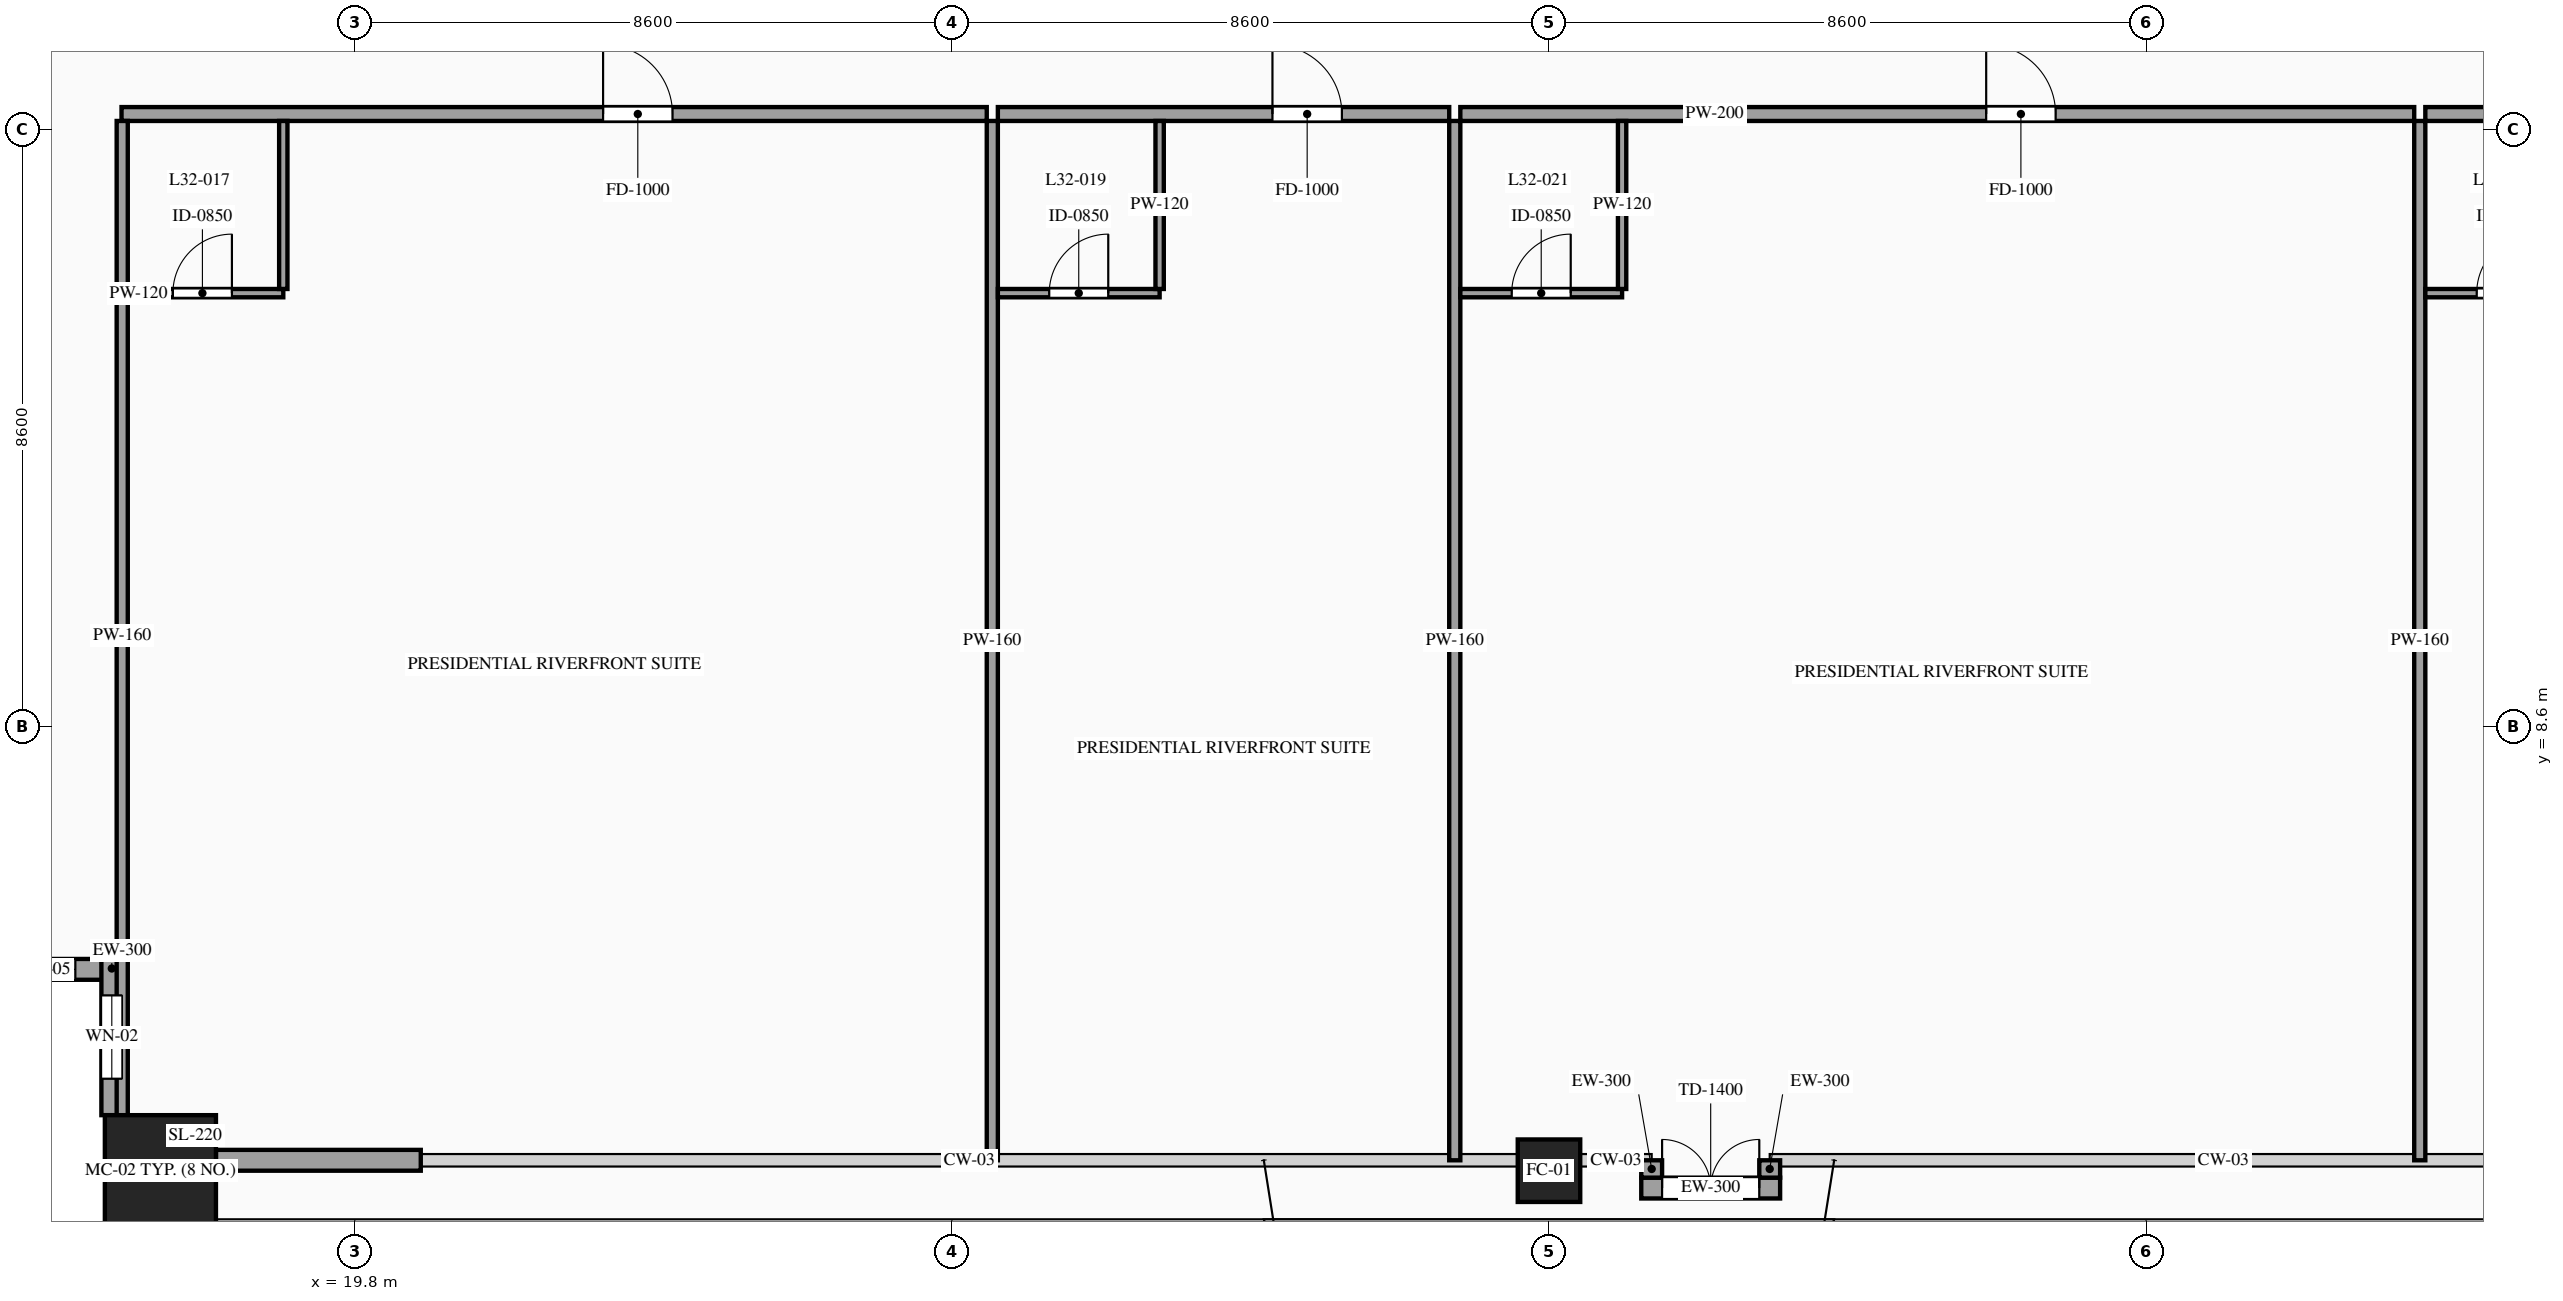
"""IFC4 building model, lengths in metres.
Left out: names, types, materials, properties, quantities, classifications, styles, units other than length and angle.
Written with IfcOpenShell. Run it as: python <this file> out.ifc"""

import sys

from ifc_helpers import new_model, si_unit, direction, frame, frame_2d, origin, origin_2d, place, context, subcontext, project, spatial, rectangle, hollow_rectangle, extrude, source, transform, mapped, element, fill, save


model = new_model("IFC4")
c1 = context("Model", 3, precision=1e-05, world=origin(), true_north=direction((0.0, 1.0)))
c2 = subcontext(c1, "Body", "Model", "MODEL_VIEW")
j1 = project(units=[si_unit("LENGTHUNIT", "METRE"), si_unit("PLANEANGLEUNIT", "RADIAN")], contexts=[c1])
p1 = place(None, origin())
s1 = spatial("IfcSite", under=j1, at=p1, CompositionType="ELEMENT")
p2 = place(p1, origin())
s2 = spatial("IfcBuilding", under=s1, at=p2, CompositionType="ELEMENT")
p3 = place(p2, frame((0.0, 0.0, 122.6)))
s3 = spatial("IfcBuildingStorey", under=s2, at=p3, CompositionType="ELEMENT", Elevation=122.6)
m1 = source(origin(), c2, "Body", "SweptSolid", [
    extrude(hollow_rectangle(XDim=1.6, YDim=1.6, WallThickness=0.07, at=origin_2d()), origin(), (0.0, 0.0, 1.0), 3.6),
])
p4 = place(p3, frame((17.0, 2.2, 0.0), z_axis=(0.0, 0.0, 1.0), x_axis=(1.0, 0.0, 0.0)))
e1 = element("IfcColumn", 1, at=p4, inside=s3, PredefinedType="COLUMN", context=c2, shape_type="MappedRepresentation", body=[
    mapped(m1, transform((0.0, 0.0, 0.0), scale=1.0)),
])
m2 = source(origin(), c2, "Body", "SweptSolid", [
    extrude(hollow_rectangle(XDim=0.9, YDim=0.9, WallThickness=0.042, at=origin_2d()), origin(), (0.0, 0.0, 1.0), 3.6),
])
p5 = place(p3, frame((37.0, 2.2, 0.0), z_axis=(0.0, 0.0, 1.0), x_axis=(1.0, 0.0, 0.0)))
e2 = element("IfcColumn", 2, at=p5, inside=s3, PredefinedType="COLUMN", context=c2, shape_type="MappedRepresentation", body=[
    mapped(m2, transform((0.0, 0.0, 0.0), scale=1.0)),
])
p6 = place(p3, frame((14.2, 5.1, 0.0), z_axis=(0.0, 0.0, 1.0), x_axis=(1.0, 0.0, 0.0)))
e3 = element("IfcWall", 3, at=p6, inside=s3, PredefinedType="SOLIDWALL", context=c2, shape_type="SweptSolid", body=[
    extrude(rectangle(XDim=2.25, YDim=0.3, at=frame_2d((1.125, 0.0))), origin(), (0.0, 0.0, 1.0), 3.38),
])
p7 = place(p6, frame((0.675, 0.0, 0.85)))
e4 = element("IfcOpeningElement", 4, at=p7, cuts=e3, PredefinedType="OPENING", context=c2, shape_type="SweptSolid", body=[
    extrude(rectangle(XDim=0.9, YDim=1.5, at=frame_2d((0.45, 0.75))), frame((0.0, 0.165, 0.0), z_axis=(0.0, -1.0, 0.0), x_axis=(1.0, 0.0, 0.0)), (0.0, 0.0, 1.0), 0.33),
])
p8 = place(p3, frame((16.3, 5.25, 0.0), z_axis=(0.0, 0.0, 1.0), x_axis=(0.0, -1.0, 0.0)))
e5 = element("IfcWall", 5, at=p8, inside=s3, PredefinedType="SOLIDWALL", context=c2, shape_type="SweptSolid", body=[
    extrude(rectangle(XDim=2.25, YDim=0.3, at=frame_2d((1.125, 0.0))), origin(), (0.0, 0.0, 1.0), 3.38),
])
p9 = place(p8, frame((0.525, 0.0, 0.85)))
e6 = element("IfcOpeningElement", 6, at=p9, cuts=e5, PredefinedType="OPENING", context=c2, shape_type="SweptSolid", body=[
    extrude(rectangle(XDim=1.2, YDim=2.1, at=frame_2d((0.6, 1.05))), frame((0.0, 0.165, 0.0), z_axis=(0.0, -1.0, 0.0), x_axis=(1.0, 0.0, 0.0)), (0.0, 0.0, 1.0), 0.33),
])
m3 = source(origin(), c2, "Body", "SweptSolid", [
    extrude(rectangle(XDim=2.95, YDim=0.3, at=frame_2d((1.475, 0.0))), origin(), (0.0, 0.0, 1.0), 2.775),
])
p10 = place(p3, frame((17.8, 2.35, 0.0), z_axis=(0.0, 0.0, 1.0), x_axis=(1.0, 0.0, 0.0)))
e7 = element("IfcWall", 7, at=p10, inside=s3, PredefinedType="SOLIDWALL", context=c2, shape_type="MappedRepresentation", body=[
    mapped(m3, transform((0.0, 0.0, 0.0), scale=1.0)),
])
p11 = place(p3, frame((38.329, 1.95, 0.0), z_axis=(0.0, 0.0, 1.0), x_axis=(1.0, 0.0, 0.0)))
e8 = element("IfcWall", 8, at=p11, inside=s3, PredefinedType="SOLIDWALL", context=c2, shape_type="SweptSolid", body=[
    extrude(rectangle(XDim=2.0, YDim=0.3, at=frame_2d((1.0, 0.0))), origin(), (0.0, 0.0, 1.0), 3.38),
])
p12 = place(p11, frame((0.3, 0.0, 0.0)))
e9 = element("IfcOpeningElement", 9, at=p12, cuts=e8, PredefinedType="OPENING", context=c2, shape_type="SweptSolid", body=[
    extrude(rectangle(XDim=1.4, YDim=2.3, at=frame_2d((0.7, 1.15))), frame((0.0, 0.165, 0.0), z_axis=(0.0, -1.0, 0.0), x_axis=(1.0, 0.0, 0.0)), (0.0, 0.0, 1.0), 0.33),
])
m4 = source(origin(), c2, "Body", "SweptSolid", [
    extrude(rectangle(XDim=0.25, YDim=0.3, at=frame_2d((0.125, 0.0))), origin(), (0.0, 0.0, 1.0), 3.38),
])
for number, where, z_axis, x_axis in (
    (10, (38.479, 2.35, 0.0), (0.0, 0.0, 1.0), (0.0, -1.0, 0.0)),
    (11, (40.179, 2.1, 0.0), (0.0, 0.0, 1.0), (0.0, 1.0, 0.0)),
):
    element("IfcWall", number, at=place(p3, frame(where, z_axis=z_axis, x_axis=x_axis)), inside=s3, PredefinedType="SOLIDWALL", context=c2, shape_type="MappedRepresentation", body=[
        mapped(m4, transform((0.0, 0.0, 0.0), scale=1.0)),
    ])
p13 = place(p3, frame((16.44, 17.42, 0.0), z_axis=(0.0, 0.0, 1.0), x_axis=(1.0, 0.0, 0.0)))
e12 = element("IfcWall", 12, at=p13, inside=s3, PredefinedType="PARTITIONING", context=c2, shape_type="SweptSolid", body=[
    extrude(rectangle(XDim=12.462, YDim=0.2, at=frame_2d((6.231, 0.0))), origin(), (0.0, 0.0, 1.0), 3.38),
])
p14 = place(p13, frame((6.936, 0.0, 0.0)))
e13 = element("IfcOpeningElement", 13, at=p14, cuts=e12, PredefinedType="OPENING", context=c2, shape_type="SweptSolid", body=[
    extrude(rectangle(XDim=1.0, YDim=2.2, at=frame_2d((0.5, 1.1))), frame((0.0, 0.115, 0.0), z_axis=(0.0, -1.0, 0.0), x_axis=(1.0, 0.0, 0.0)), (0.0, 0.0, 1.0), 0.23),
])
m5 = source(origin(), c2, "Body", "SweptSolid", [
    extrude(rectangle(XDim=14.97, YDim=0.16, at=frame_2d((7.485, 0.0))), origin(), (0.0, 0.0, 1.0), 3.38),
])
p15 = place(p3, frame((28.982, 2.35, 0.0), z_axis=(0.0, 0.0, 1.0), x_axis=(0.0, 1.0, 0.0)))
e14 = element("IfcWall", 14, at=p15, inside=s3, PredefinedType="PARTITIONING", context=c2, shape_type="MappedRepresentation", body=[
    mapped(m5, transform((0.0, 0.0, 0.0), scale=1.0)),
])
p16 = place(p3, frame((16.44, 14.84, 0.0), z_axis=(0.0, 0.0, 1.0), x_axis=(1.0, 0.0, 0.0)))
e15 = element("IfcWall", 15, at=p16, inside=s3, PredefinedType="PARTITIONING", context=c2, shape_type="SweptSolid", body=[
    extrude(rectangle(XDim=2.33, YDim=0.12, at=frame_2d((1.165, 0.0))), origin(), (0.0, 0.0, 1.0), 3.38),
])
p17 = place(p16, frame((0.74, 0.0, 0.0)))
e16 = element("IfcOpeningElement", 16, at=p17, cuts=e15, PredefinedType="OPENING", context=c2, shape_type="SweptSolid", body=[
    extrude(rectangle(XDim=0.85, YDim=2.1, at=frame_2d((0.425, 1.05))), frame((0.0, 0.075, 0.0), z_axis=(0.0, -1.0, 0.0), x_axis=(1.0, 0.0, 0.0)), (0.0, 0.0, 1.0), 0.15),
])
m6 = source(origin(), c2, "Body", "SweptSolid", [
    extrude(rectangle(XDim=2.42, YDim=0.12, at=frame_2d((1.21, 0.0))), origin(), (0.0, 0.0, 1.0), 3.38),
])
p18 = place(p3, frame((18.77, 14.9, 0.0), z_axis=(0.0, 0.0, 1.0), x_axis=(0.0, 1.0, 0.0)))
e17 = element("IfcWall", 17, at=p18, inside=s3, PredefinedType="PARTITIONING", context=c2, shape_type="MappedRepresentation", body=[
    mapped(m6, transform((0.0, 0.0, 0.0), scale=1.0)),
])
p19 = place(p3, frame((29.062, 17.42, 0.0), z_axis=(0.0, 0.0, 1.0), x_axis=(1.0, 0.0, 0.0)))
e18 = element("IfcWall", 18, at=p19, inside=s3, PredefinedType="PARTITIONING", context=c2, shape_type="SweptSolid", body=[
    extrude(rectangle(XDim=6.501, YDim=0.2, at=frame_2d((3.25, 0.0))), origin(), (0.0, 0.0, 1.0), 3.38),
])
p20 = place(p19, frame((3.955, 0.0, 0.0)))
e19 = element("IfcOpeningElement", 19, at=p20, cuts=e18, PredefinedType="OPENING", context=c2, shape_type="SweptSolid", body=[
    extrude(rectangle(XDim=1.0, YDim=2.2, at=frame_2d((0.5, 1.1))), frame((0.0, 0.115, 0.0), z_axis=(0.0, -1.0, 0.0), x_axis=(1.0, 0.0, 0.0)), (0.0, 0.0, 1.0), 0.23),
])
p21 = place(p3, frame((35.643, 2.35, 0.0), z_axis=(0.0, 0.0, 1.0), x_axis=(0.0, 1.0, 0.0)))
e20 = element("IfcWall", 20, at=p21, inside=s3, PredefinedType="PARTITIONING", context=c2, shape_type="MappedRepresentation", body=[
    mapped(m5, transform((0.0, 0.0, 0.0), scale=1.0)),
])
p22 = place(p3, frame((29.062, 14.84, 0.0), z_axis=(0.0, 0.0, 1.0), x_axis=(1.0, 0.0, 0.0)))
e21 = element("IfcWall", 21, at=p22, inside=s3, PredefinedType="PARTITIONING", context=c2, shape_type="SweptSolid", body=[
    extrude(rectangle(XDim=2.33, YDim=0.12, at=frame_2d((1.165, 0.0))), origin(), (0.0, 0.0, 1.0), 3.38),
])
p23 = place(p22, frame((0.74, 0.0, 0.0)))
e22 = element("IfcOpeningElement", 22, at=p23, cuts=e21, PredefinedType="OPENING", context=c2, shape_type="SweptSolid", body=[
    extrude(rectangle(XDim=0.85, YDim=2.1, at=frame_2d((0.425, 1.05))), frame((0.0, 0.075, 0.0), z_axis=(0.0, -1.0, 0.0), x_axis=(1.0, 0.0, 0.0)), (0.0, 0.0, 1.0), 0.15),
])
p24 = place(p3, frame((31.392, 14.9, 0.0), z_axis=(0.0, 0.0, 1.0), x_axis=(0.0, 1.0, 0.0)))
e23 = element("IfcWall", 23, at=p24, inside=s3, PredefinedType="PARTITIONING", context=c2, shape_type="MappedRepresentation", body=[
    mapped(m6, transform((0.0, 0.0, 0.0), scale=1.0)),
])
p25 = place(p3, frame((35.723, 17.42, 0.0), z_axis=(0.0, 0.0, 1.0), x_axis=(1.0, 0.0, 0.0)))
e24 = element("IfcWall", 24, at=p25, inside=s3, PredefinedType="PARTITIONING", context=c2, shape_type="SweptSolid", body=[
    extrude(rectangle(XDim=13.739, YDim=0.2, at=frame_2d((6.87, 0.0))), origin(), (0.0, 0.0, 1.0), 3.38),
])
p26 = place(p25, frame((7.574, 0.0, 0.0)))
e25 = element("IfcOpeningElement", 25, at=p26, cuts=e24, PredefinedType="OPENING", context=c2, shape_type="SweptSolid", body=[
    extrude(rectangle(XDim=1.0, YDim=2.2, at=frame_2d((0.5, 1.1))), frame((0.0, 0.115, 0.0), z_axis=(0.0, -1.0, 0.0), x_axis=(1.0, 0.0, 0.0)), (0.0, 0.0, 1.0), 0.23),
])
p27 = place(p3, frame((49.542, 2.35, 0.0), z_axis=(0.0, 0.0, 1.0), x_axis=(0.0, 1.0, 0.0)))
e26 = element("IfcWall", 26, at=p27, inside=s3, PredefinedType="PARTITIONING", context=c2, shape_type="MappedRepresentation", body=[
    mapped(m5, transform((0.0, 0.0, 0.0), scale=1.0)),
])
p28 = place(p3, frame((35.723, 14.84, 0.0), z_axis=(0.0, 0.0, 1.0), x_axis=(1.0, 0.0, 0.0)))
e27 = element("IfcWall", 27, at=p28, inside=s3, PredefinedType="PARTITIONING", context=c2, shape_type="SweptSolid", body=[
    extrude(rectangle(XDim=2.33, YDim=0.12, at=frame_2d((1.165, 0.0))), origin(), (0.0, 0.0, 1.0), 3.38),
])
p29 = place(p28, frame((0.74, 0.0, 0.0)))
e28 = element("IfcOpeningElement", 28, at=p29, cuts=e27, PredefinedType="OPENING", context=c2, shape_type="SweptSolid", body=[
    extrude(rectangle(XDim=0.85, YDim=2.1, at=frame_2d((0.425, 1.05))), frame((0.0, 0.075, 0.0), z_axis=(0.0, -1.0, 0.0), x_axis=(1.0, 0.0, 0.0)), (0.0, 0.0, 1.0), 0.15),
])
p30 = place(p3, frame((38.053, 14.9, 0.0), z_axis=(0.0, 0.0, 1.0), x_axis=(0.0, 1.0, 0.0)))
e29 = element("IfcWall", 29, at=p30, inside=s3, PredefinedType="PARTITIONING", context=c2, shape_type="MappedRepresentation", body=[
    mapped(m6, transform((0.0, 0.0, 0.0), scale=1.0)),
])
p31 = place(p3, frame((49.622, 17.42, 0.0), z_axis=(0.0, 0.0, 1.0), x_axis=(1.0, 0.0, 0.0)))
e30 = element("IfcWall", 30, at=p31, inside=s3, PredefinedType="PARTITIONING", context=c2, shape_type="SweptSolid", body=[
    extrude(rectangle(XDim=7.938, YDim=0.2, at=frame_2d((3.969, 0.0))), origin(), (0.0, 0.0, 1.0), 3.38),
])
p32 = place(p31, frame((4.674, 0.0, 0.0)))
e31 = element("IfcOpeningElement", 31, at=p32, cuts=e30, PredefinedType="OPENING", context=c2, shape_type="SweptSolid", body=[
    extrude(rectangle(XDim=1.0, YDim=2.2, at=frame_2d((0.5, 1.1))), frame((0.0, 0.115, 0.0), z_axis=(0.0, -1.0, 0.0), x_axis=(1.0, 0.0, 0.0)), (0.0, 0.0, 1.0), 0.23),
])
m7 = source(origin(), c2, "Body", "SweptSolid", [
    extrude(rectangle(XDim=14.82, YDim=0.16, at=frame_2d((7.41, 0.0))), origin(), (0.0, 0.0, 1.0), 3.38),
])
p33 = place(p3, frame((16.45, 2.5, 0.0), z_axis=(0.0, 0.0, 1.0), x_axis=(0.0, 1.0, 0.0)))
e32 = element("IfcWall", 32, at=p33, inside=s3, PredefinedType="PARTITIONING", context=c2, shape_type="MappedRepresentation", body=[
    mapped(m7, transform((0.0, 0.0, 0.0), scale=1.0)),
])
p34 = place(p3, frame((49.622, 14.84, 0.0), z_axis=(0.0, 0.0, 1.0), x_axis=(1.0, 0.0, 0.0)))
e33 = element("IfcWall", 33, at=p34, inside=s3, PredefinedType="PARTITIONING", context=c2, shape_type="SweptSolid", body=[
    extrude(rectangle(XDim=2.33, YDim=0.12, at=frame_2d((1.165, 0.0))), origin(), (0.0, 0.0, 1.0), 3.38),
])
p35 = place(p34, frame((0.74, 0.0, 0.0)))
e34 = element("IfcOpeningElement", 34, at=p35, cuts=e33, PredefinedType="OPENING", context=c2, shape_type="SweptSolid", body=[
    extrude(rectangle(XDim=0.85, YDim=2.1, at=frame_2d((0.425, 1.05))), frame((0.0, 0.075, 0.0), z_axis=(0.0, -1.0, 0.0), x_axis=(1.0, 0.0, 0.0)), (0.0, 0.0, 1.0), 0.15),
])
m8 = source(origin(), c2, "Body", "SweptSolid", [
    extrude(rectangle(XDim=0.9, YDim=1.5, at=frame_2d((0.45, 0.75))), frame((0.0, 0.03, 0.0), z_axis=(0.0, -1.0, 0.0), x_axis=(1.0, 0.0, 0.0)), (0.0, 0.0, 1.0), 0.06),
])
p36 = place(p7, origin())
e35 = element("IfcWindow", 35, at=p36, inside=s3, PartitioningType="SINGLE_PANEL", PredefinedType="WINDOW", context=c2, shape_type="MappedRepresentation", body=[
    mapped(m8, transform((0.0, 0.0, 0.0), scale=1.0)),
])
fill(e4, e35)
m9 = source(origin(), c2, "Body", "SweptSolid", [
    extrude(rectangle(XDim=1.2, YDim=2.1, at=frame_2d((0.6, 1.05))), frame((0.0, 0.03, 0.0), z_axis=(0.0, -1.0, 0.0), x_axis=(1.0, 0.0, 0.0)), (0.0, 0.0, 1.0), 0.06),
])
p37 = place(p9, origin())
e36 = element("IfcWindow", 36, at=p37, inside=s3, PartitioningType="SINGLE_PANEL", PredefinedType="WINDOW", context=c2, shape_type="MappedRepresentation", body=[
    mapped(m9, transform((0.0, 0.0, 0.0), scale=1.0)),
])
fill(e6, e36)
m10 = source(origin(), c2, "Body", "SweptSolid", [
    extrude(rectangle(XDim=1.4, YDim=2.3, at=frame_2d((0.7, 1.15))), frame((0.0, 0.025, 0.0), z_axis=(0.0, -1.0, 0.0), x_axis=(1.0, 0.0, 0.0)), (0.0, 0.0, 1.0), 0.05),
])
p38 = place(p12, origin())
e37 = element("IfcDoor", 37, at=p38, inside=s3, OperationType="DOUBLE_DOOR_SINGLE_SWING", PredefinedType="DOOR", context=c2, shape_type="MappedRepresentation", body=[
    mapped(m10, transform((0.0, 0.0, 0.0), scale=1.0)),
])
fill(e9, e37)
m11 = source(origin(), c2, "Body", "SweptSolid", [
    extrude(rectangle(XDim=1.0, YDim=2.2, at=frame_2d((0.5, 1.1))), frame((0.0, 0.025, 0.0), z_axis=(0.0, -1.0, 0.0), x_axis=(1.0, 0.0, 0.0)), (0.0, 0.0, 1.0), 0.05),
])
p39 = place(p14, origin())
e38 = element("IfcDoor", 38, at=p39, inside=s3, OperationType="SINGLE_SWING_LEFT", PredefinedType="DOOR", context=c2, shape_type="MappedRepresentation", body=[
    mapped(m11, transform((0.0, 0.0, 0.0), scale=1.0)),
])
fill(e13, e38)
m12 = source(origin(), c2, "Body", "SweptSolid", [
    extrude(rectangle(XDim=0.85, YDim=2.1, at=frame_2d((0.425, 1.05))), frame((0.0, 0.025, 0.0), z_axis=(0.0, -1.0, 0.0), x_axis=(1.0, 0.0, 0.0)), (0.0, 0.0, 1.0), 0.05),
])
p40 = place(p17, origin())
e39 = element("IfcDoor", 39, at=p40, inside=s3, OperationType="SINGLE_SWING_RIGHT", PredefinedType="DOOR", context=c2, shape_type="MappedRepresentation", body=[
    mapped(m12, transform((0.0, 0.0, 0.0), scale=1.0)),
])
fill(e16, e39)
p41 = place(p20, origin())
e40 = element("IfcDoor", 40, at=p41, inside=s3, OperationType="SINGLE_SWING_LEFT", PredefinedType="DOOR", context=c2, shape_type="MappedRepresentation", body=[
    mapped(m11, transform((0.0, 0.0, 0.0), scale=1.0)),
])
fill(e19, e40)
p42 = place(p23, origin())
e41 = element("IfcDoor", 41, at=p42, inside=s3, OperationType="SINGLE_SWING_RIGHT", PredefinedType="DOOR", context=c2, shape_type="MappedRepresentation", body=[
    mapped(m12, transform((0.0, 0.0, 0.0), scale=1.0)),
])
fill(e22, e41)
p43 = place(p26, origin())
e42 = element("IfcDoor", 42, at=p43, inside=s3, OperationType="SINGLE_SWING_LEFT", PredefinedType="DOOR", context=c2, shape_type="MappedRepresentation", body=[
    mapped(m11, transform((0.0, 0.0, 0.0), scale=1.0)),
])
fill(e25, e42)
p44 = place(p29, origin())
e43 = element("IfcDoor", 43, at=p44, inside=s3, OperationType="SINGLE_SWING_RIGHT", PredefinedType="DOOR", context=c2, shape_type="MappedRepresentation", body=[
    mapped(m12, transform((0.0, 0.0, 0.0), scale=1.0)),
])
fill(e28, e43)
p45 = place(p35, origin())
e44 = element("IfcDoor", 44, at=p45, inside=s3, OperationType="SINGLE_SWING_RIGHT", PredefinedType="DOOR", context=c2, shape_type="MappedRepresentation", body=[
    mapped(m12, transform((0.0, 0.0, 0.0), scale=1.0)),
])
fill(e34, e44)
save(model, sys.argv[1])
